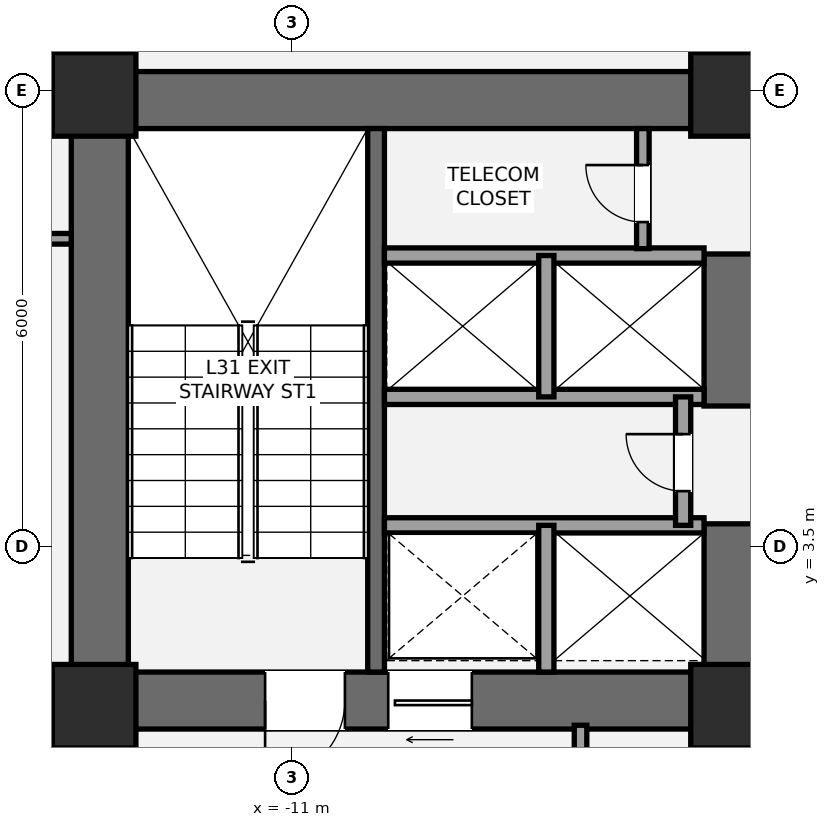
"""IFC4 building model, lengths in metres.
Left out: names, types, materials, properties, quantities, classifications, styles, units other than length and angle.
Written with IfcOpenShell. Run it as: python <this file> out.ifc"""

import sys

from ifc_helpers import new_model, si_unit, direction, frame, frame_2d, origin, origin_2d, place, context, subcontext, project, spatial, rectangle, extrude, element, fill, save


model = new_model("IFC4")
c1 = context("Model", 3, precision=1e-05, world=origin(), true_north=direction((0.0, 1.0)))
c2 = subcontext(c1, "Body", "Model", "MODEL_VIEW")
j1 = project(units=[si_unit("LENGTHUNIT", "METRE"), si_unit("PLANEANGLEUNIT", "RADIAN")], contexts=[c1])
p1 = place(None, origin())
s1 = spatial("IfcSite", under=j1, at=p1, CompositionType="ELEMENT")
p2 = place(p1, origin())
s2 = spatial("IfcBuilding", under=s1, at=p2, CompositionType="ELEMENT")
p3 = place(p2, frame((0.0, 0.0, 117.6)))
s3 = spatial("IfcBuildingStorey", under=s2, at=p3, CompositionType="ELEMENT", Elevation=117.6)
p4 = place(p3, frame((-13.525, 1.1, 0.0), z_axis=(0.0, 0.0, 1.0), x_axis=(0.0, 1.0, 0.0)))
e1 = element("IfcWall", 1, at=p4, inside=s3, PredefinedType="SHEAR", context=c2, shape_type="SweptSolid", body=[
    extrude(rectangle(XDim=8.65, YDim=0.75, at=frame_2d((4.325, 0.0))), origin(), (0.0, 0.0, 1.0), 3.5),
])
p5 = place(p3, frame((-13.9, 9.375, 0.0), z_axis=(0.0, 0.0, 1.0), x_axis=(1.0, 0.0, 0.0)))
e2 = element("IfcWall", 2, at=p5, inside=s3, PredefinedType="SHEAR", context=c2, shape_type="SweptSolid", body=[
    extrude(rectangle(XDim=9.475, YDim=0.75, at=frame_2d((4.737, 0.0))), origin(), (0.0, 0.0, 1.0), 3.5),
])
p6 = place(p3, frame((-4.825, 1.475, 0.0), z_axis=(0.0, 0.0, 1.0), x_axis=(-1.0, 0.0, 0.0)))
e3 = element("IfcWall", 3, at=p6, inside=s3, PredefinedType="SHEAR", context=c2, shape_type="SweptSolid", body=[
    extrude(rectangle(XDim=9.075, YDim=0.75, at=frame_2d((4.538, 0.0))), origin(), (0.0, 0.0, 1.0), 3.5),
])
p7 = place(p6, frame((5.475, 0.0, 0.0)))
e4 = element("IfcOpeningElement", 4, at=p7, cuts=e3, PredefinedType="OPENING", context=c2, shape_type="SweptSolid", body=[
    extrude(rectangle(XDim=1.05, YDim=2.15, at=frame_2d((0.525, 1.075))), frame((0.0, 0.385, 0.0), z_axis=(0.0, -1.0, 0.0), x_axis=(1.0, 0.0, 0.0)), (0.0, 0.0, 1.0), 0.77),
])
p8 = place(p6, frame((3.805, 0.0, 0.0)))
e5 = element("IfcOpeningElement", 5, at=p8, cuts=e3, PredefinedType="OPENING", context=c2, shape_type="SweptSolid", body=[
    extrude(rectangle(XDim=1.1, YDim=2.2, at=frame_2d((0.55, 1.1))), frame((0.0, 0.385, 0.0), z_axis=(0.0, -1.0, 0.0), x_axis=(1.0, 0.0, 0.0)), (0.0, 0.0, 1.0), 0.77),
])
p9 = place(p3, frame((-5.2, 1.1, 0.0), z_axis=(0.0, 0.0, 1.0), x_axis=(0.0, 1.0, 0.0)))
e6 = element("IfcWall", 6, at=p9, inside=s3, PredefinedType="SHEAR", context=c2, shape_type="SweptSolid", body=[
    extrude(rectangle(XDim=2.7, YDim=0.75, at=frame_2d((1.35, 0.0))), origin(), (0.0, 0.0, 1.0), 3.5),
])
p10 = place(p3, frame((-5.2, 5.35, 0.0), z_axis=(0.0, 0.0, 1.0), x_axis=(0.0, 1.0, 0.0)))
e7 = element("IfcWall", 7, at=p10, inside=s3, PredefinedType="SHEAR", context=c2, shape_type="SweptSolid", body=[
    extrude(rectangle(XDim=2.0, YDim=0.75, at=frame_2d((1.0, 0.0))), origin(), (0.0, 0.0, 1.0), 3.5),
])
p11 = place(p3, frame((-9.89, 1.85, 0.0), z_axis=(0.0, 0.0, 1.0), x_axis=(0.0, 1.0, 0.0)))
e8 = element("IfcWall", 8, at=p11, inside=s3, PredefinedType="SHEAR", context=c2, shape_type="SweptSolid", body=[
    extrude(rectangle(XDim=7.15, YDim=0.22, at=frame_2d((3.575, 0.0))), origin(), (0.0, 0.0, 1.0), 3.5),
])
p12 = place(p3, frame((-4.8, 9.0, 0.0), z_axis=(0.0, 0.0, 1.0), x_axis=(0.0, 1.0, 0.0)))
e9 = element("IfcWall", 9, at=p12, inside=s3, PredefinedType="SHEAR", context=c2, shape_type="SweptSolid", body=[
    extrude(rectangle(XDim=4.15, YDim=0.75, at=frame_2d((2.075, 0.0))), origin(), (0.0, 0.0, 1.0), 3.5),
])
for number, where, z_axis, x_axis in (
    (10, (-13.6, 1.4, 0.0), (0.0, 0.0, 1.0), (1.0, 0.0, 0.0)),
    (11, (-13.6, 9.45, 0.0), (0.0, 0.0, 1.0), (1.0, 0.0, 0.0)),
    (12, (-5.2, 1.4, 0.0), (0.0, 0.0, 1.0), (1.0, 0.0, 0.0)),
    (13, (-5.2, 9.45, 0.0), (0.0, 0.0, 1.0), (1.0, 0.0, 0.0)),
):
    element("IfcColumn", number, at=place(p3, frame(where, z_axis=z_axis, x_axis=x_axis)), inside=s3, PredefinedType="COLUMN", context=c2, shape_type="SweptSolid", body=[
        extrude(rectangle(XDim=1.1, YDim=1.1, at=origin_2d()), origin(), (0.0, 0.0, 1.0), 3.5),
    ])
p13 = place(p3, frame((-13.45, -2.15, 0.0), z_axis=(0.0, 0.0, 1.0), x_axis=(0.0, 1.0, 0.0)))
e14 = element("IfcWall", 14, at=p13, inside=s3, PredefinedType="PARTITIONING", context=c2, shape_type="SweptSolid", body=[
    extrude(rectangle(XDim=3.3, YDim=0.165, at=frame_2d((1.65, 0.0))), origin(), (0.0, 0.0, 1.0), 2.763),
])
p14 = place(p13, frame((1.15, 0.0, 0.0)))
e15 = element("IfcOpeningElement", 15, at=p14, cuts=e14, PredefinedType="OPENING", context=c2, shape_type="SweptSolid", body=[
    extrude(rectangle(XDim=1.05, YDim=2.15, at=frame_2d((0.525, 1.075))), frame((0.0, 0.093, 0.0), z_axis=(0.0, -1.0, 0.0), x_axis=(1.0, 0.0, 0.0)), (0.0, 0.0, 1.0), 0.185),
])
p15 = place(p3, frame((-7.2, -2.15, 0.0), z_axis=(0.0, 0.0, 1.0), x_axis=(0.0, 1.0, 0.0)))
e16 = element("IfcWall", 16, at=p15, inside=s3, PredefinedType="PARTITIONING", context=c2, shape_type="SweptSolid", body=[
    extrude(rectangle(XDim=3.3, YDim=0.165, at=frame_2d((1.65, 0.0))), origin(), (0.0, 0.0, 1.0), 3.31),
])
p16 = place(p3, frame((-4.95, -2.15, 0.0), z_axis=(0.0, 0.0, 1.0), x_axis=(0.0, 1.0, 0.0)))
e17 = element("IfcWall", 17, at=p16, inside=s3, PredefinedType="SOLIDWALL", context=c2, shape_type="SweptSolid", body=[
    extrude(rectangle(XDim=3.3, YDim=0.2, at=frame_2d((1.65, 0.0))), origin(), (0.0, 0.0, 1.0), 2.763),
])
p17 = place(p16, frame((0.95, 0.0, 0.0)))
e18 = element("IfcOpeningElement", 18, at=p17, cuts=e17, PredefinedType="OPENING", context=c2, shape_type="SweptSolid", body=[
    extrude(rectangle(XDim=0.75, YDim=2.1, at=frame_2d((0.375, 1.05))), frame((0.0, 0.11, 0.0), z_axis=(0.0, -1.0, 0.0), x_axis=(1.0, 0.0, 0.0)), (0.0, 0.0, 1.0), 0.22),
])
p18 = place(p3, frame((-9.78, 3.78, 0.0), z_axis=(0.0, 0.0, 1.0), x_axis=(1.0, 0.0, 0.0)))
e19 = element("IfcWall", 19, at=p18, inside=s3, PredefinedType="SOLIDWALL", context=c2, shape_type="SweptSolid", body=[
    extrude(rectangle(XDim=4.205, YDim=0.2, at=frame_2d((2.103, 0.0))), origin(), (0.0, 0.0, 1.0), 3.31),
])
p19 = place(p3, frame((-7.65, 1.85, 0.0), z_axis=(0.0, 0.0, 1.0), x_axis=(0.0, 1.0, 0.0)))
e20 = element("IfcWall", 20, at=p19, inside=s3, PredefinedType="SOLIDWALL", context=c2, shape_type="SweptSolid", body=[
    extrude(rectangle(XDim=1.93, YDim=0.2, at=frame_2d((0.965, 0.0))), origin(), (0.0, 0.0, 1.0), 3.31),
])
for number, where, z_axis, x_axis in (
    (21, (-9.78, 5.47, 0.0), (0.0, 0.0, 1.0), (1.0, 0.0, 0.0)),
    (22, (-9.78, 7.33, 0.0), (0.0, 0.0, 1.0), (1.0, 0.0, 0.0)),
):
    element("IfcWall", number, at=place(p3, frame(where, z_axis=z_axis, x_axis=x_axis)), inside=s3, PredefinedType="SOLIDWALL", context=c2, shape_type="SweptSolid", body=[
        extrude(rectangle(XDim=4.205, YDim=0.2, at=frame_2d((2.103, 0.0))), origin(), (0.0, 0.0, 1.0), 3.31),
    ])
p20 = place(p3, frame((-7.65, 5.47, 0.0), z_axis=(0.0, 0.0, 1.0), x_axis=(0.0, 1.0, 0.0)))
e23 = element("IfcWall", 23, at=p20, inside=s3, PredefinedType="SOLIDWALL", context=c2, shape_type="SweptSolid", body=[
    extrude(rectangle(XDim=1.86, YDim=0.2, at=frame_2d((0.93, 0.0))), origin(), (0.0, 0.0, 1.0), 3.31),
])
p21 = place(p3, frame((-5.85, 3.78, 0.0), z_axis=(0.0, 0.0, 1.0), x_axis=(0.0, 1.0, 0.0)))
e24 = element("IfcWall", 24, at=p21, inside=s3, PredefinedType="SOLIDWALL", context=c2, shape_type="SweptSolid", body=[
    extrude(rectangle(XDim=1.69, YDim=0.2, at=frame_2d((0.845, 0.0))), origin(), (0.0, 0.0, 1.0), 3.31),
])
p22 = place(p21, frame((0.45, 0.0, 0.0)))
e25 = element("IfcOpeningElement", 25, at=p22, cuts=e24, PredefinedType="OPENING", context=c2, shape_type="SweptSolid", body=[
    extrude(rectangle(XDim=0.75, YDim=2.1, at=frame_2d((0.375, 1.05))), frame((0.0, 0.11, 0.0), z_axis=(0.0, -1.0, 0.0), x_axis=(1.0, 0.0, 0.0)), (0.0, 0.0, 1.0), 0.22),
])
p23 = place(p3, frame((-6.38, 7.42, 0.0), z_axis=(0.0, 0.0, 1.0), x_axis=(0.0, 1.0, 0.0)))
e26 = element("IfcWall", 26, at=p23, inside=s3, PredefinedType="PARTITIONING", context=c2, shape_type="SweptSolid", body=[
    extrude(rectangle(XDim=1.58, YDim=0.165, at=frame_2d((0.79, 0.0))), origin(), (0.0, 0.0, 1.0), 3.31),
])
p24 = place(p23, frame((0.35, 0.0, 0.0)))
e27 = element("IfcOpeningElement", 27, at=p24, cuts=e26, PredefinedType="OPENING", context=c2, shape_type="SweptSolid", body=[
    extrude(rectangle(XDim=0.75, YDim=2.1, at=frame_2d((0.375, 1.05))), frame((0.0, 0.093, 0.0), z_axis=(0.0, -1.0, 0.0), x_axis=(1.0, 0.0, 0.0)), (0.0, 0.0, 1.0), 0.185),
])
p25 = place(p3, frame((-16.2, 7.55, 0.0), z_axis=(0.0, 0.0, 1.0), x_axis=(1.0, 0.0, 0.0)))
e28 = element("IfcWall", 28, at=p25, inside=s3, PredefinedType="PARTITIONING", context=c2, shape_type="SweptSolid", body=[
    extrude(rectangle(XDim=2.3, YDim=0.14, at=frame_2d((1.15, 0.0))), origin(), (0.0, 0.0, 1.0), 2.763),
])
p26 = place(p25, frame((0.32, 0.0, 0.0)))
e29 = element("IfcOpeningElement", 29, at=p26, cuts=e28, PredefinedType="OPENING", context=c2, shape_type="SweptSolid", body=[
    extrude(rectangle(XDim=0.92, YDim=2.15, at=frame_2d((0.46, 1.075))), frame((0.0, 0.08, 0.0), z_axis=(0.0, -1.0, 0.0), x_axis=(1.0, 0.0, 0.0)), (0.0, 0.0, 1.0), 0.16),
])
p27 = place(p7, origin())
e30 = element("IfcDoor", 30, at=p27, inside=s3, OperationType="SINGLE_SWING_RIGHT", PredefinedType="DOOR", context=c2, shape_type="SweptSolid", body=[
    extrude(rectangle(XDim=1.05, YDim=2.15, at=frame_2d((0.525, 1.075))), frame((0.0, 0.025, 0.0), z_axis=(0.0, -1.0, 0.0), x_axis=(1.0, 0.0, 0.0)), (0.0, 0.0, 1.0), 0.05),
])
fill(e4, e30)
p28 = place(p8, origin())
e31 = element("IfcDoor", 31, at=p28, inside=s3, OperationType="SLIDING_TO_LEFT", PredefinedType="DOOR", context=c2, shape_type="SweptSolid", body=[
    extrude(rectangle(XDim=1.1, YDim=2.2, at=frame_2d((0.55, 1.1))), frame((0.0, 0.025, 0.0), z_axis=(0.0, -1.0, 0.0), x_axis=(1.0, 0.0, 0.0)), (0.0, 0.0, 1.0), 0.05),
])
fill(e5, e31)
p29 = place(p22, origin())
e32 = element("IfcDoor", 32, at=p29, inside=s3, OperationType="SINGLE_SWING_RIGHT", PredefinedType="DOOR", context=c2, shape_type="SweptSolid", body=[
    extrude(rectangle(XDim=0.75, YDim=2.1, at=frame_2d((0.375, 1.05))), frame((0.0, 0.025, 0.0), z_axis=(0.0, -1.0, 0.0), x_axis=(1.0, 0.0, 0.0)), (0.0, 0.0, 1.0), 0.05),
])
fill(e25, e32)
p30 = place(p24, origin())
e33 = element("IfcDoor", 33, at=p30, inside=s3, OperationType="SINGLE_SWING_RIGHT", PredefinedType="DOOR", context=c2, shape_type="SweptSolid", body=[
    extrude(rectangle(XDim=0.75, YDim=2.1, at=frame_2d((0.375, 1.05))), frame((0.0, 0.025, 0.0), z_axis=(0.0, -1.0, 0.0), x_axis=(1.0, 0.0, 0.0)), (0.0, 0.0, 1.0), 0.05),
])
fill(e27, e33)
save(model, sys.argv[1])
